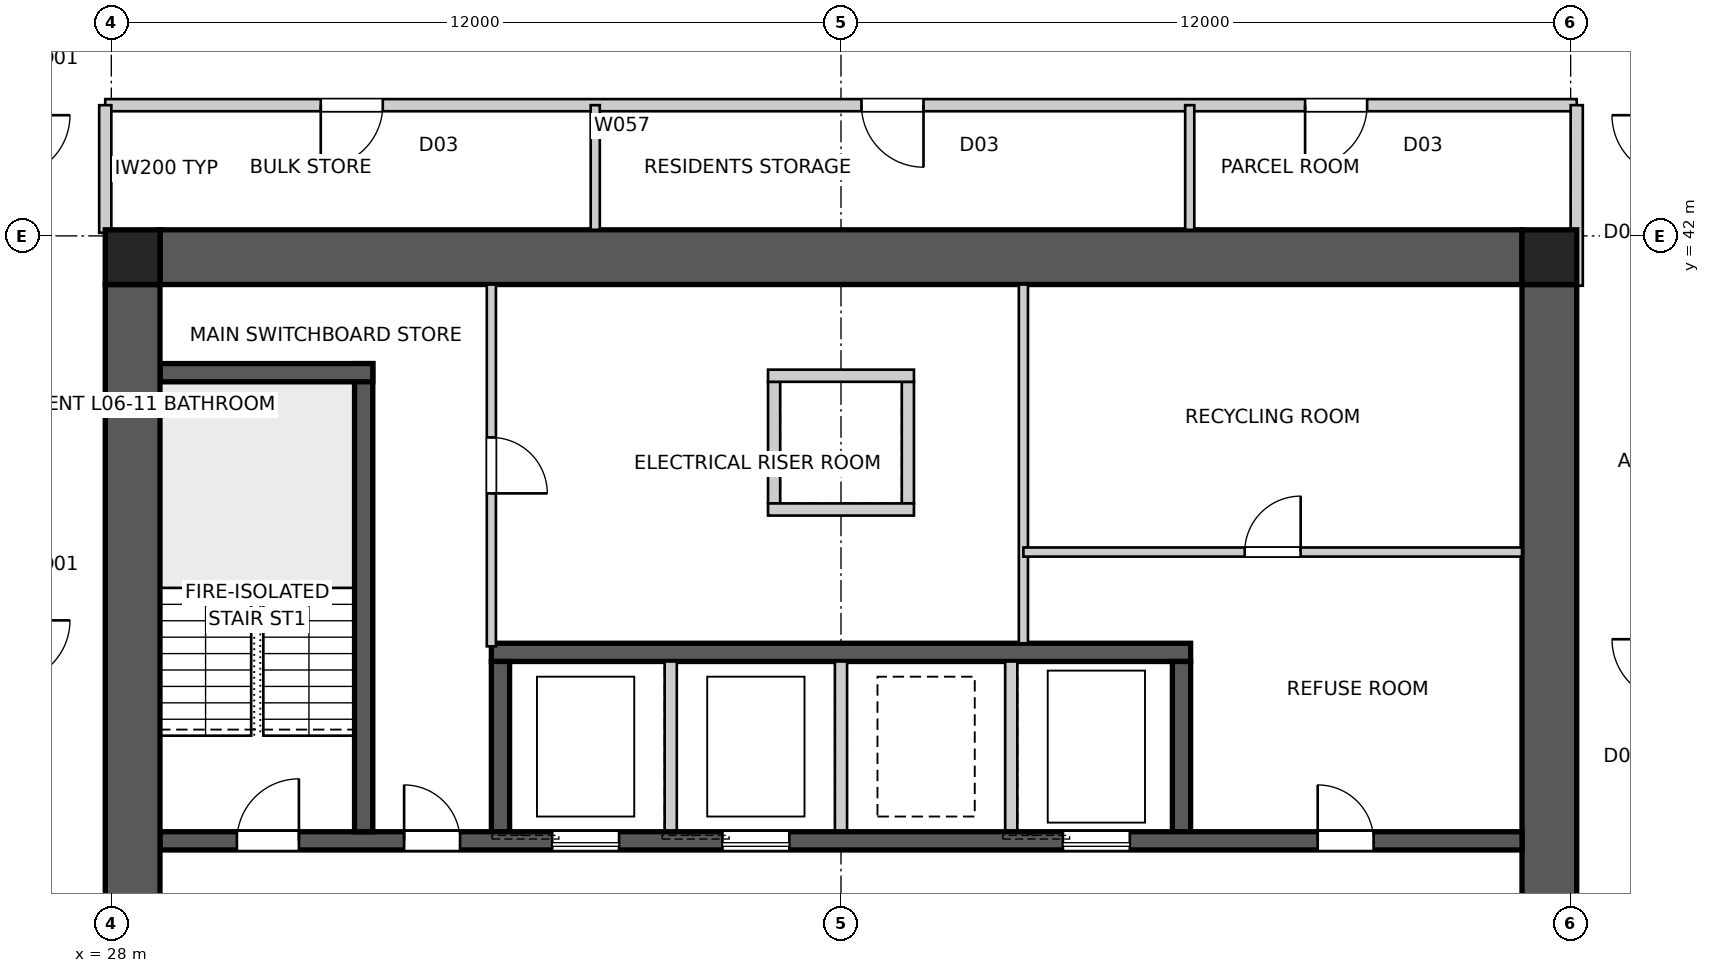
"""IFC4 building model, lengths in metres.
Left out: names, types, materials, properties, quantities, classifications, styles, units other than length and angle.
Written with IfcOpenShell. Run it as: python <this file> out.ifc"""

import sys

from ifc_helpers import new_model, si_unit, direction, frame, frame_2d, origin, origin_2d, place, context, subcontext, project, spatial, polyline, rectangle, outline, extrude, element, fill, save


model = new_model("IFC4")
c1 = context("Model", 3, precision=1e-05, world=origin(), true_north=direction((0.0, 1.0)))
c2 = subcontext(c1, "Body", "Model", "MODEL_VIEW")
j1 = project(units=[si_unit("LENGTHUNIT", "METRE"), si_unit("PLANEANGLEUNIT", "RADIAN")], contexts=[c1])
p1 = place(None, origin())
s1 = spatial("IfcSite", under=j1, at=p1, CompositionType="ELEMENT")
p2 = place(p1, origin())
s2 = spatial("IfcBuilding", under=s1, at=p2, CompositionType="ELEMENT")
p3 = place(p2, frame((0.0, 0.0, 25.2)))
s3 = spatial("IfcBuildingStorey", under=s2, at=p3, CompositionType="ELEMENT", Elevation=25.2)
p4 = place(p3, frame((28.8, 41.65, 0.0), z_axis=(0.0, 0.0, 1.0), x_axis=(1.0, 0.0, 0.0)))
e1 = element("IfcWall", 1, at=p4, inside=s3, PredefinedType="SHEAR", context=c2, shape_type="SweptSolid", body=[
    extrude(outline(polyline([(0.0, -0.45), (22.4, -0.45), (22.4, -0.025), (22.85, -0.025), (22.85, 0.025), (22.4, 0.025), (22.4, 0.45), (0.0, 0.45), (0.0, 0.025), (-0.45, 0.025), (-0.45, -0.025), (0.0, -0.025), (0.0, -0.45)])), origin(), (0.0, 0.0, 1.0), 3.4),
])
p5 = place(p3, frame((51.65, 18.8, 0.0), z_axis=(0.0, 0.0, 1.0), x_axis=(0.0, 1.0, 0.0)))
e2 = element("IfcWall", 2, at=p5, inside=s3, PredefinedType="SHEAR", context=c2, shape_type="SweptSolid", body=[
    extrude(outline(polyline([(0.0, -0.45), (22.4, -0.45), (22.4, -0.025), (22.85, -0.025), (22.85, 0.025), (22.4, 0.025), (22.4, 0.45), (0.0, 0.45), (0.0, 0.025), (-0.45, 0.025), (-0.45, -0.025), (0.0, -0.025), (0.0, -0.45)])), origin(), (0.0, 0.0, 1.0), 3.4),
])
p6 = place(p5, frame((11.14, 0.0, 0.0)))
e3 = element("IfcOpeningElement", 3, at=p6, cuts=e2, PredefinedType="OPENING", context=c2, shape_type="SweptSolid", body=[
    extrude(rectangle(XDim=1.02, YDim=2.4, at=frame_2d((0.51, 1.2))), frame((0.0, 0.46, 0.0), z_axis=(0.0, -1.0, 0.0), x_axis=(1.0, 0.0, 0.0)), (0.0, 0.0, 1.0), 0.92),
])
p7 = place(p3, frame((28.35, 41.2, 0.0), z_axis=(0.0, 0.0, 1.0), x_axis=(0.0, -1.0, 0.0)))
e4 = element("IfcWall", 4, at=p7, inside=s3, PredefinedType="SHEAR", context=c2, shape_type="SweptSolid", body=[
    extrude(outline(polyline([(0.0, -0.45), (22.4, -0.45), (22.4, -0.025), (22.85, -0.025), (22.85, 0.025), (22.4, 0.025), (22.4, 0.45), (0.0, 0.45), (0.0, 0.025), (-0.45, 0.025), (-0.45, -0.025), (0.0, -0.025), (0.0, -0.45)])), origin(), (0.0, 0.0, 1.0), 3.4),
])
p8 = place(p7, frame((11.14, 0.0, 0.0)))
e5 = element("IfcOpeningElement", 5, at=p8, cuts=e4, PredefinedType="OPENING", context=c2, shape_type="SweptSolid", body=[
    extrude(rectangle(XDim=1.02, YDim=2.4, at=frame_2d((0.51, 1.2))), frame((0.0, 0.46, 0.0), z_axis=(0.0, -1.0, 0.0), x_axis=(1.0, 0.0, 0.0)), (0.0, 0.0, 1.0), 0.92),
])
p9 = place(p3, frame((28.8, 32.05, 0.0), z_axis=(0.0, 0.0, 1.0), x_axis=(1.0, 0.0, 0.0)))
e6 = element("IfcWall", 6, at=p9, inside=s3, PredefinedType="SHEAR", context=c2, shape_type="SweptSolid", body=[
    extrude(rectangle(XDim=22.4, YDim=0.3, at=frame_2d((11.2, 0.0))), origin(), (0.0, 0.0, 1.0), 3.4),
])
p10 = place(p9, frame((19.04, 0.0, 0.0)))
e7 = element("IfcOpeningElement", 7, at=p10, cuts=e6, PredefinedType="OPENING", context=c2, shape_type="SweptSolid", body=[
    extrude(rectangle(XDim=0.92, YDim=2.1, at=frame_2d((0.46, 1.05))), frame((0.0, 0.16, 0.0), z_axis=(0.0, -1.0, 0.0), x_axis=(1.0, 0.0, 0.0)), (0.0, 0.0, 1.0), 0.32),
])
p11 = place(p9, frame((1.265, 0.0, 0.0)))
e8 = element("IfcOpeningElement", 8, at=p11, cuts=e6, PredefinedType="OPENING", context=c2, shape_type="SweptSolid", body=[
    extrude(rectangle(XDim=1.02, YDim=2.1, at=frame_2d((0.51, 1.05))), frame((0.0, 0.16, 0.0), z_axis=(0.0, -1.0, 0.0), x_axis=(1.0, 0.0, 0.0)), (0.0, 0.0, 1.0), 0.32),
])
p12 = place(p9, frame((4.015, 0.0, 0.0)))
e9 = element("IfcOpeningElement", 9, at=p12, cuts=e6, PredefinedType="OPENING", context=c2, shape_type="SweptSolid", body=[
    extrude(rectangle(XDim=0.92, YDim=2.1, at=frame_2d((0.46, 1.05))), frame((0.0, 0.16, 0.0), z_axis=(0.0, -1.0, 0.0), x_axis=(1.0, 0.0, 0.0)), (0.0, 0.0, 1.0), 0.32),
])
p13 = place(p9, frame((6.45, 0.0, 0.0)))
e10 = element("IfcOpeningElement", 10, at=p13, cuts=e6, PredefinedType="OPENING", context=c2, shape_type="SweptSolid", body=[
    extrude(rectangle(XDim=1.1, YDim=2.1, at=frame_2d((0.55, 1.05))), frame((0.0, 0.16, 0.0), z_axis=(0.0, -1.0, 0.0), x_axis=(1.0, 0.0, 0.0)), (0.0, 0.0, 1.0), 0.32),
])
p14 = place(p9, frame((9.25, 0.0, 0.0)))
e11 = element("IfcOpeningElement", 11, at=p14, cuts=e6, PredefinedType="OPENING", context=c2, shape_type="SweptSolid", body=[
    extrude(rectangle(XDim=1.1, YDim=2.1, at=frame_2d((0.55, 1.05))), frame((0.0, 0.16, 0.0), z_axis=(0.0, -1.0, 0.0), x_axis=(1.0, 0.0, 0.0)), (0.0, 0.0, 1.0), 0.32),
])
p15 = place(p9, frame((14.85, 0.0, 0.0)))
e12 = element("IfcOpeningElement", 12, at=p15, cuts=e6, PredefinedType="OPENING", context=c2, shape_type="SweptSolid", body=[
    extrude(rectangle(XDim=1.1, YDim=2.1, at=frame_2d((0.55, 1.05))), frame((0.0, 0.16, 0.0), z_axis=(0.0, -1.0, 0.0), x_axis=(1.0, 0.0, 0.0)), (0.0, 0.0, 1.0), 0.32),
])
p16 = place(p3, frame((34.25, 35.15, 0.0), z_axis=(0.0, 0.0, 1.0), x_axis=(1.0, 0.0, 0.0)))
e13 = element("IfcWall", 13, at=p16, inside=s3, PredefinedType="SHEAR", context=c2, shape_type="SweptSolid", body=[
    extrude(rectangle(XDim=11.5, YDim=0.3, at=frame_2d((5.75, 0.0))), origin(), (0.0, 0.0, 1.0), 3.4),
])
p17 = place(p3, frame((34.4, 32.2, 0.0), z_axis=(0.0, 0.0, 1.0), x_axis=(0.0, 1.0, 0.0)))
e14 = element("IfcWall", 14, at=p17, inside=s3, PredefinedType="SHEAR", context=c2, shape_type="SweptSolid", body=[
    extrude(rectangle(XDim=2.8, YDim=0.3, at=frame_2d((1.4, 0.0))), origin(), (0.0, 0.0, 1.0), 3.4),
])
for number, where, z_axis, x_axis in (
    (15, (37.2, 32.2, 0.0), (0.0, 0.0, 1.0), (0.0, 1.0, 0.0)),
    (16, (40.0, 32.2, 0.0), (0.0, 0.0, 1.0), (0.0, 1.0, 0.0)),
    (17, (42.8, 32.2, 0.0), (0.0, 0.0, 1.0), (0.0, 1.0, 0.0)),
):
    element("IfcWall", number, at=place(p3, frame(where, z_axis=z_axis, x_axis=x_axis)), inside=s3, PredefinedType="SOLIDWALL", context=c2, shape_type="SweptSolid", body=[
        extrude(rectangle(XDim=2.8, YDim=0.2, at=frame_2d((1.4, 0.0))), origin(), (0.0, 0.0, 1.0), 3.4),
    ])
p18 = place(p3, frame((45.6, 32.2, 0.0), z_axis=(0.0, 0.0, 1.0), x_axis=(0.0, 1.0, 0.0)))
e18 = element("IfcWall", 18, at=p18, inside=s3, PredefinedType="SHEAR", context=c2, shape_type="SweptSolid", body=[
    extrude(rectangle(XDim=2.8, YDim=0.3, at=frame_2d((1.4, 0.0))), origin(), (0.0, 0.0, 1.0), 3.4),
])
p19 = place(p3, frame((32.15, 32.2, 0.0), z_axis=(0.0, 0.0, 1.0), x_axis=(0.0, 1.0, 0.0)))
e19 = element("IfcWall", 19, at=p19, inside=s3, PredefinedType="SHEAR", context=c2, shape_type="SweptSolid", body=[
    extrude(rectangle(XDim=7.7, YDim=0.3, at=frame_2d((3.85, 0.0))), origin(), (0.0, 0.0, 1.0), 3.4),
])
p20 = place(p3, frame((28.8, 39.75, 0.0), z_axis=(0.0, 0.0, 1.0), x_axis=(1.0, 0.0, 0.0)))
e20 = element("IfcWall", 20, at=p20, inside=s3, PredefinedType="SHEAR", context=c2, shape_type="SweptSolid", body=[
    extrude(rectangle(XDim=3.5, YDim=0.3, at=frame_2d((1.75, 0.0))), origin(), (0.0, 0.0, 1.0), 3.4),
])
for number, where, z_axis, x_axis in (
    (21, (38.9, 37.6, 0.0), (0.0, 0.0, 1.0), (0.0, 1.0, 0.0)),
    (22, (41.1, 37.6, 0.0), (0.0, 0.0, 1.0), (0.0, 1.0, 0.0)),
):
    element("IfcWall", number, at=place(p3, frame(where, z_axis=z_axis, x_axis=x_axis)), inside=s3, PredefinedType="SOLIDWALL", context=c2, shape_type="SweptSolid", body=[
        extrude(rectangle(XDim=2.0, YDim=0.2, at=frame_2d((1.0, 0.0))), origin(), (0.0, 0.0, 1.0), 3.4),
    ])
for number, where, z_axis, x_axis in (
    (23, (38.8, 37.5, 0.0), (0.0, 0.0, 1.0), (1.0, 0.0, 0.0)),
    (24, (38.8, 39.7, 0.0), (0.0, 0.0, 1.0), (1.0, 0.0, 0.0)),
):
    element("IfcWall", number, at=place(p3, frame(where, z_axis=z_axis, x_axis=x_axis)), inside=s3, PredefinedType="SOLIDWALL", context=c2, shape_type="SweptSolid", body=[
        extrude(rectangle(XDim=2.4, YDim=0.2, at=frame_2d((1.2, 0.0))), origin(), (0.0, 0.0, 1.0), 3.4),
    ])
for number, where, z_axis, x_axis in (
    (25, (51.65, 41.65, 0.0), (0.0, 0.0, 1.0), (1.0, 0.0, 0.0)),
    (26, (28.35, 41.65, 0.0), (0.0, 0.0, 1.0), (1.0, 0.0, 0.0)),
):
    element("IfcColumn", number, at=place(p3, frame(where, z_axis=z_axis, x_axis=x_axis)), inside=s3, PredefinedType="COLUMN", context=c2, shape_type="SweptSolid", body=[
        extrude(rectangle(XDim=0.9, YDim=0.9, at=origin_2d()), origin(), (0.0, 0.0, 1.0), 3.4),
    ])
p21 = place(p3, frame((34.25, 41.2, 0.0), z_axis=(0.0, 0.0, 1.0), x_axis=(0.0, -1.0, 0.0)))
e27 = element("IfcWall", 27, at=p21, inside=s3, PredefinedType="SOLIDWALL", context=c2, shape_type="SweptSolid", body=[
    extrude(rectangle(XDim=5.95, YDim=0.15, at=frame_2d((2.975, 0.0))), origin(), (0.0, 0.0, 1.0), 3.25),
])
p22 = place(p21, frame((2.515, 0.0, 0.0)))
e28 = element("IfcOpeningElement", 28, at=p22, cuts=e27, PredefinedType="OPENING", context=c2, shape_type="SweptSolid", body=[
    extrude(rectangle(XDim=0.92, YDim=2.1, at=frame_2d((0.46, 1.05))), frame((0.0, 0.085, 0.0), z_axis=(0.0, -1.0, 0.0), x_axis=(1.0, 0.0, 0.0)), (0.0, 0.0, 1.0), 0.17),
])
p23 = place(p3, frame((43.0, 41.2, 0.0), z_axis=(0.0, 0.0, 1.0), x_axis=(0.0, -1.0, 0.0)))
e29 = element("IfcWall", 29, at=p23, inside=s3, PredefinedType="SOLIDWALL", context=c2, shape_type="SweptSolid", body=[
    extrude(rectangle(XDim=5.9, YDim=0.15, at=frame_2d((2.95, 0.0))), origin(), (0.0, 0.0, 1.0), 3.25),
])
p24 = place(p3, frame((43.0, 36.8, 0.0), z_axis=(0.0, 0.0, 1.0), x_axis=(1.0, 0.0, 0.0)))
e30 = element("IfcWall", 30, at=p24, inside=s3, PredefinedType="SOLIDWALL", context=c2, shape_type="SweptSolid", body=[
    extrude(rectangle(XDim=8.2, YDim=0.15, at=frame_2d((4.1, 0.0))), origin(), (0.0, 0.0, 1.0), 3.25),
])
p25 = place(p24, frame((3.64, 0.0, 0.0)))
e31 = element("IfcOpeningElement", 31, at=p25, cuts=e30, PredefinedType="OPENING", context=c2, shape_type="SweptSolid", body=[
    extrude(rectangle(XDim=0.92, YDim=2.1, at=frame_2d((0.46, 1.05))), frame((0.0, 0.085, 0.0), z_axis=(0.0, -1.0, 0.0), x_axis=(1.0, 0.0, 0.0)), (0.0, 0.0, 1.0), 0.17),
])
p26 = place(p3, frame((52.1, 44.15, 0.0), z_axis=(0.0, 0.0, 1.0), x_axis=(-1.0, 0.0, 0.0)))
e32 = element("IfcWall", 32, at=p26, inside=s3, PredefinedType="PARTITIONING", context=c2, shape_type="SweptSolid", body=[
    extrude(rectangle(XDim=24.2, YDim=0.2, at=frame_2d((12.1, 0.0))), origin(), (0.0, 0.0, 1.0), 3.25),
])
p27 = place(p26, frame((10.743, 0.0, 0.0)))
e33 = element("IfcOpeningElement", 33, at=p27, cuts=e32, PredefinedType="OPENING", context=c2, shape_type="SweptSolid", body=[
    extrude(rectangle(XDim=1.02, YDim=2.1, at=frame_2d((0.51, 1.05))), frame((0.0, 0.11, 0.0), z_axis=(0.0, -1.0, 0.0), x_axis=(1.0, 0.0, 0.0)), (0.0, 0.0, 1.0), 0.22),
])
p28 = place(p26, frame((19.636, 0.0, 0.0)))
e34 = element("IfcOpeningElement", 34, at=p28, cuts=e32, PredefinedType="OPENING", context=c2, shape_type="SweptSolid", body=[
    extrude(rectangle(XDim=1.02, YDim=2.1, at=frame_2d((0.51, 1.05))), frame((0.0, 0.11, 0.0), z_axis=(0.0, -1.0, 0.0), x_axis=(1.0, 0.0, 0.0)), (0.0, 0.0, 1.0), 0.22),
])
p29 = place(p26, frame((3.447, 0.0, 0.0)))
e35 = element("IfcOpeningElement", 35, at=p29, cuts=e32, PredefinedType="OPENING", context=c2, shape_type="SweptSolid", body=[
    extrude(rectangle(XDim=1.02, YDim=2.1, at=frame_2d((0.51, 1.05))), frame((0.0, 0.11, 0.0), z_axis=(0.0, -1.0, 0.0), x_axis=(1.0, 0.0, 0.0)), (0.0, 0.0, 1.0), 0.22),
])
p30 = place(p3, frame((27.9, 44.15, 0.0), z_axis=(0.0, 0.0, 1.0), x_axis=(0.0, -1.0, 0.0)))
e36 = element("IfcWall", 36, at=p30, inside=s3, PredefinedType="PARTITIONING", context=c2, shape_type="SweptSolid", body=[
    extrude(rectangle(XDim=2.1, YDim=0.2, at=frame_2d((1.05, 0.0))), origin(), (0.0, 0.0, 1.0), 3.25),
])
p31 = place(p3, frame((52.1, 41.18, 0.0), z_axis=(0.0, 0.0, 1.0), x_axis=(0.0, 1.0, 0.0)))
e37 = element("IfcWall", 37, at=p31, inside=s3, PredefinedType="PARTITIONING", context=c2, shape_type="SweptSolid", body=[
    extrude(rectangle(XDim=2.97, YDim=0.2, at=frame_2d((1.485, 0.0))), origin(), (0.0, 0.0, 1.0), 3.25),
])
p32 = place(p3, frame((35.958, 42.1, 0.0), z_axis=(0.0, 0.0, 1.0), x_axis=(0.0, 1.0, 0.0)))
e38 = element("IfcWall", 38, at=p32, inside=s3, PredefinedType="SOLIDWALL", context=c2, shape_type="SweptSolid", body=[
    extrude(rectangle(XDim=2.05, YDim=0.15, at=frame_2d((1.025, 0.0))), origin(), (0.0, 0.0, 1.0), 3.25),
])
p33 = place(p3, frame((45.735, 42.1, 0.0), z_axis=(0.0, 0.0, 1.0), x_axis=(0.0, 1.0, 0.0)))
e39 = element("IfcWall", 39, at=p33, inside=s3, PredefinedType="SOLIDWALL", context=c2, shape_type="SweptSolid", body=[
    extrude(rectangle(XDim=2.05, YDim=0.15, at=frame_2d((1.025, 0.0))), origin(), (0.0, 0.0, 1.0), 2.796),
])
p34 = place(p10, origin())
e40 = element("IfcDoor", 40, at=p34, inside=s3, OperationType="SINGLE_SWING_LEFT", PredefinedType="DOOR", context=c2, shape_type="SweptSolid", body=[
    extrude(rectangle(XDim=0.92, YDim=2.1, at=frame_2d((0.46, 1.05))), frame((0.0, 0.025, 0.0), z_axis=(0.0, -1.0, 0.0), x_axis=(1.0, 0.0, 0.0)), (0.0, 0.0, 1.0), 0.05),
])
fill(e7, e40)
p35 = place(p11, origin())
e41 = element("IfcDoor", 41, at=p35, inside=s3, OperationType="SINGLE_SWING_RIGHT", PredefinedType="DOOR", context=c2, shape_type="SweptSolid", body=[
    extrude(rectangle(XDim=1.02, YDim=2.1, at=frame_2d((0.51, 1.05))), frame((0.0, 0.025, 0.0), z_axis=(0.0, -1.0, 0.0), x_axis=(1.0, 0.0, 0.0)), (0.0, 0.0, 1.0), 0.05),
])
fill(e8, e41)
p36 = place(p12, origin())
e42 = element("IfcDoor", 42, at=p36, inside=s3, OperationType="SINGLE_SWING_LEFT", PredefinedType="DOOR", context=c2, shape_type="SweptSolid", body=[
    extrude(rectangle(XDim=0.92, YDim=2.1, at=frame_2d((0.46, 1.05))), frame((0.0, 0.025, 0.0), z_axis=(0.0, -1.0, 0.0), x_axis=(1.0, 0.0, 0.0)), (0.0, 0.0, 1.0), 0.05),
])
fill(e9, e42)
p37 = place(p27, origin())
e43 = element("IfcDoor", 43, at=p37, inside=s3, OperationType="SINGLE_SWING_LEFT", PredefinedType="DOOR", context=c2, shape_type="SweptSolid", body=[
    extrude(rectangle(XDim=1.02, YDim=2.1, at=frame_2d((0.51, 1.05))), frame((0.0, 0.025, 0.0), z_axis=(0.0, -1.0, 0.0), x_axis=(1.0, 0.0, 0.0)), (0.0, 0.0, 1.0), 0.05),
])
fill(e33, e43)
p38 = place(p28, origin())
e44 = element("IfcDoor", 44, at=p38, inside=s3, OperationType="SINGLE_SWING_RIGHT", PredefinedType="DOOR", context=c2, shape_type="SweptSolid", body=[
    extrude(rectangle(XDim=1.02, YDim=2.1, at=frame_2d((0.51, 1.05))), frame((0.0, 0.025, 0.0), z_axis=(0.0, -1.0, 0.0), x_axis=(1.0, 0.0, 0.0)), (0.0, 0.0, 1.0), 0.05),
])
fill(e34, e44)
p39 = place(p29, origin())
e45 = element("IfcDoor", 45, at=p39, inside=s3, OperationType="SINGLE_SWING_RIGHT", PredefinedType="DOOR", context=c2, shape_type="SweptSolid", body=[
    extrude(rectangle(XDim=1.02, YDim=2.1, at=frame_2d((0.51, 1.05))), frame((0.0, 0.025, 0.0), z_axis=(0.0, -1.0, 0.0), x_axis=(1.0, 0.0, 0.0)), (0.0, 0.0, 1.0), 0.05),
])
fill(e35, e45)
p40 = place(p25, origin())
e46 = element("IfcDoor", 46, at=p40, inside=s3, OperationType="SINGLE_SWING_RIGHT", PredefinedType="DOOR", context=c2, shape_type="SweptSolid", body=[
    extrude(rectangle(XDim=0.92, YDim=2.1, at=frame_2d((0.46, 1.05))), frame((0.0, 0.025, 0.0), z_axis=(0.0, -1.0, 0.0), x_axis=(1.0, 0.0, 0.0)), (0.0, 0.0, 1.0), 0.05),
])
fill(e31, e46)
p41 = place(p22, origin())
e47 = element("IfcDoor", 47, at=p41, inside=s3, OperationType="SINGLE_SWING_RIGHT", PredefinedType="DOOR", context=c2, shape_type="SweptSolid", body=[
    extrude(rectangle(XDim=0.92, YDim=2.1, at=frame_2d((0.46, 1.05))), frame((0.0, 0.025, 0.0), z_axis=(0.0, -1.0, 0.0), x_axis=(1.0, 0.0, 0.0)), (0.0, 0.0, 1.0), 0.05),
])
fill(e28, e47)
p42 = place(p13, origin())
e48 = element("IfcDoor", 48, at=p42, inside=s3, OperationType="SLIDING_TO_LEFT", PredefinedType="DOOR", context=c2, shape_type="SweptSolid", body=[
    extrude(rectangle(XDim=1.1, YDim=2.1, at=frame_2d((0.55, 1.05))), frame((0.0, 0.025, 0.0), z_axis=(0.0, -1.0, 0.0), x_axis=(1.0, 0.0, 0.0)), (0.0, 0.0, 1.0), 0.05),
])
fill(e10, e48)
p43 = place(p14, origin())
e49 = element("IfcDoor", 49, at=p43, inside=s3, OperationType="SLIDING_TO_LEFT", PredefinedType="DOOR", context=c2, shape_type="SweptSolid", body=[
    extrude(rectangle(XDim=1.1, YDim=2.1, at=frame_2d((0.55, 1.05))), frame((0.0, 0.025, 0.0), z_axis=(0.0, -1.0, 0.0), x_axis=(1.0, 0.0, 0.0)), (0.0, 0.0, 1.0), 0.05),
])
fill(e11, e49)
p44 = place(p15, origin())
e50 = element("IfcDoor", 50, at=p44, inside=s3, OperationType="SLIDING_TO_LEFT", PredefinedType="DOOR", context=c2, shape_type="SweptSolid", body=[
    extrude(rectangle(XDim=1.1, YDim=2.1, at=frame_2d((0.55, 1.05))), frame((0.0, 0.025, 0.0), z_axis=(0.0, -1.0, 0.0), x_axis=(1.0, 0.0, 0.0)), (0.0, 0.0, 1.0), 0.05),
])
fill(e12, e50)
save(model, sys.argv[1])
